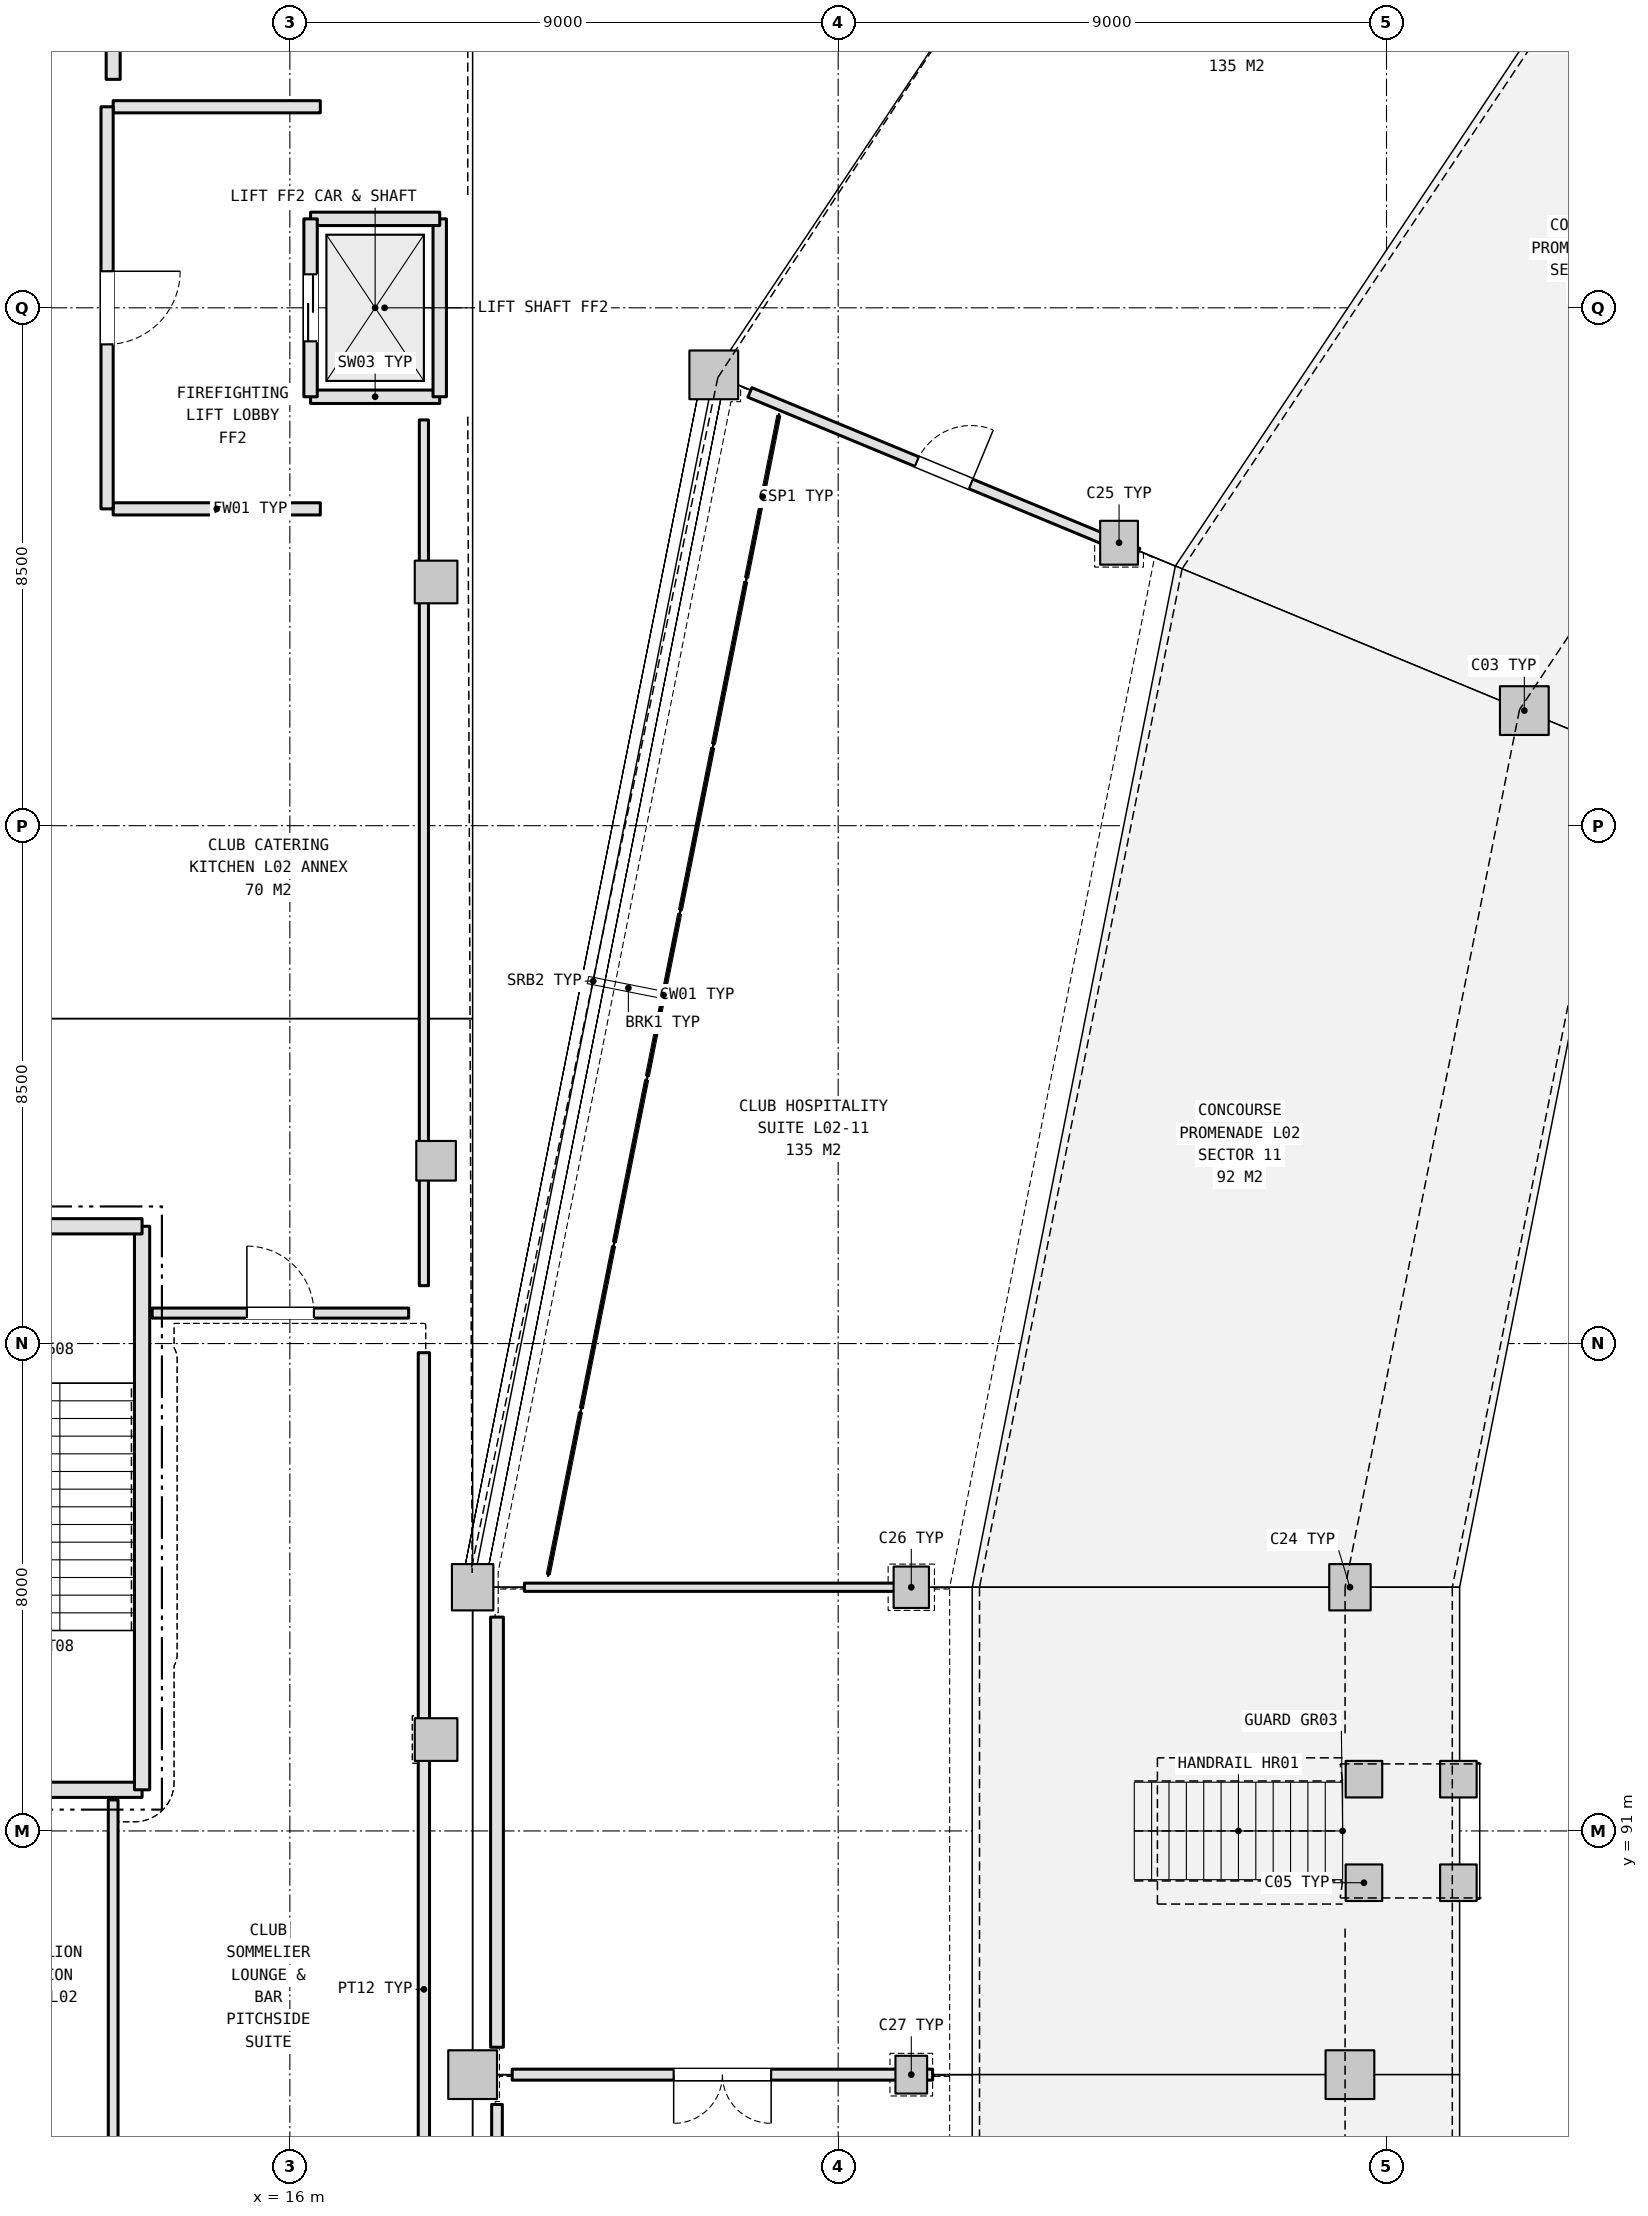
"""IFC4 building model, lengths in metres.
Left out: names, types, materials, properties, quantities, classifications, styles, units other than length and angle.
Written with IfcOpenShell. Run it as: python <this file> out.ifc"""

import sys

from ifc_helpers import new_model, si_unit, direction, frame, frame_2d, origin, origin_2d, place, context, subcontext, project, spatial, rectangle, extrude, element, fill, save


model = new_model("IFC4")
c1 = context("Model", 3, precision=1e-05, world=origin(), true_north=direction((0.0, 1.0)))
c2 = subcontext(c1, "Body", "Model", "MODEL_VIEW")
j1 = project(units=[si_unit("LENGTHUNIT", "METRE"), si_unit("PLANEANGLEUNIT", "RADIAN")], contexts=[c1])
p1 = place(None, origin())
s1 = spatial("IfcSite", under=j1, at=p1, CompositionType="ELEMENT")
p2 = place(p1, origin())
s2 = spatial("IfcBuilding", under=s1, at=p2, CompositionType="ELEMENT")
p3 = place(p2, frame((0.0, 0.0, 10.8)))
s3 = spatial("IfcBuildingStorey", under=s2, at=p3, CompositionType="ELEMENT", Elevation=10.8)
p4 = place(p3, frame((36.262, 109.389, 0.0), z_axis=(0.0, 0.0, 1.0), x_axis=(1.0, 0.0, 0.0)))
e1 = element("IfcColumn", 1, at=p4, inside=s3, PredefinedType="COLUMN", context=c2, shape_type="SweptSolid", body=[
    extrude(rectangle(XDim=0.8, YDim=0.8, at=origin_2d()), origin(), (0.0, 0.0, 1.0), 5.4),
])
p5 = place(p3, frame((29.61, 112.144, 0.0), z_axis=(0.0, 0.0, 1.0), x_axis=(1.0, 0.0, 0.0)))
e2 = element("IfcColumn", 2, at=p5, inside=s3, PredefinedType="COLUMN", context=c2, shape_type="SweptSolid", body=[
    extrude(rectangle(XDim=0.62, YDim=0.72, at=origin_2d()), origin(), (0.0, 0.0, 1.0), 5.4),
])
p6 = place(p3, frame((22.958, 114.9, 0.0), z_axis=(0.0, 0.0, 1.0), x_axis=(1.0, 0.0, 0.0)))
e3 = element("IfcColumn", 3, at=p6, inside=s3, PredefinedType="COLUMN", context=c2, shape_type="SweptSolid", body=[
    extrude(rectangle(XDim=0.8, YDim=0.8, at=origin_2d()), origin(), (0.0, 0.0, 1.0), 5.4),
])
p7 = place(p3, frame((33.4, 95.0, 0.0), z_axis=(0.0, 0.0, 1.0), x_axis=(1.0, 0.0, 0.0)))
e4 = element("IfcColumn", 4, at=p7, inside=s3, PredefinedType="COLUMN", context=c2, shape_type="SweptSolid", body=[
    extrude(rectangle(XDim=0.68, YDim=0.76, at=origin_2d()), origin(), (0.0, 0.0, 1.0), 5.4),
])
p8 = place(p3, frame((26.2, 95.0, 0.0), z_axis=(0.0, 0.0, 1.0), x_axis=(1.0, 0.0, 0.0)))
e5 = element("IfcColumn", 5, at=p8, inside=s3, PredefinedType="COLUMN", context=c2, shape_type="SweptSolid", body=[
    extrude(rectangle(XDim=0.58, YDim=0.68, at=origin_2d()), origin(), (0.0, 0.0, 1.0), 5.4),
])
p9 = place(p3, frame((19.0, 95.0, 0.0), z_axis=(0.0, 0.0, 1.0), x_axis=(1.0, 0.0, 0.0)))
e6 = element("IfcColumn", 6, at=p9, inside=s3, PredefinedType="COLUMN", context=c2, shape_type="SweptSolid", body=[
    extrude(rectangle(XDim=0.68, YDim=0.76, at=origin_2d()), origin(), (0.0, 0.0, 1.0), 5.4),
])
p10 = place(p3, frame((33.4, 87.0, 0.0), z_axis=(0.0, 0.0, 1.0), x_axis=(1.0, 0.0, 0.0)))
e7 = element("IfcColumn", 7, at=p10, inside=s3, PredefinedType="COLUMN", context=c2, shape_type="SweptSolid", body=[
    extrude(rectangle(XDim=0.8, YDim=0.8, at=origin_2d()), origin(), (0.0, 0.0, 1.0), 5.4),
])
p11 = place(p3, frame((26.2, 87.0, 0.0), z_axis=(0.0, 0.0, 1.0), x_axis=(1.0, 0.0, 0.0)))
e8 = element("IfcColumn", 8, at=p11, inside=s3, PredefinedType="COLUMN", context=c2, shape_type="SweptSolid", body=[
    extrude(rectangle(XDim=0.52, YDim=0.62, at=origin_2d()), origin(), (0.0, 0.0, 1.0), 5.4),
])
p12 = place(p3, frame((19.0, 87.0, 0.0), z_axis=(0.0, 0.0, 1.0), x_axis=(1.0, 0.0, 0.0)))
e9 = element("IfcColumn", 9, at=p12, inside=s3, PredefinedType="COLUMN", context=c2, shape_type="SweptSolid", body=[
    extrude(rectangle(XDim=0.8, YDim=0.8, at=origin_2d()), origin(), (0.0, 0.0, 1.0), 5.4),
])
p13 = place(p3, frame((18.4, 92.5, 0.0), z_axis=(0.0, 0.0, 1.0), x_axis=(1.0, 0.0, 0.0)))
e10 = element("IfcColumn", 10, at=p13, inside=s3, PredefinedType="COLUMN", context=c2, shape_type="SweptSolid", body=[
    extrude(rectangle(XDim=0.7, YDim=0.7, at=origin_2d()), origin(), (0.0, 0.0, 1.0), 5.4),
])
p14 = place(p3, frame((18.4, 102.0, 0.0), z_axis=(0.0, 0.0, 1.0), x_axis=(1.0, 0.0, 0.0)))
e11 = element("IfcColumn", 11, at=p14, inside=s3, PredefinedType="COLUMN", context=c2, shape_type="SweptSolid", body=[
    extrude(rectangle(XDim=0.65, YDim=0.65, at=origin_2d()), origin(), (0.0, 0.0, 1.0), 5.4),
])
p15 = place(p3, frame((18.4, 111.5, 0.0), z_axis=(0.0, 0.0, 1.0), x_axis=(1.0, 0.0, 0.0)))
e12 = element("IfcColumn", 12, at=p15, inside=s3, PredefinedType="COLUMN", context=c2, shape_type="SweptSolid", body=[
    extrude(rectangle(XDim=0.7, YDim=0.7, at=origin_2d()), origin(), (0.0, 0.0, 1.0), 5.4),
])
p16 = place(p3, frame((8.275, 91.675, 0.0), z_axis=(0.0, 0.0, 1.0), x_axis=(1.0, 0.0, 0.0)))
e13 = element("IfcWall", 13, at=p16, inside=s3, PredefinedType="SHEAR", context=c2, shape_type="SweptSolid", body=[
    extrude(rectangle(XDim=5.299, YDim=0.25, at=frame_2d((2.65, 0.0))), origin(), (0.0, 0.0, 1.0), 5.15),
])
p17 = place(p3, frame((13.575, 91.675, 0.0), z_axis=(0.0, 0.0, 1.0), x_axis=(0.0, 1.0, 0.0)))
e14 = element("IfcWall", 14, at=p17, inside=s3, PredefinedType="SHEAR", context=c2, shape_type="SweptSolid", body=[
    extrude(rectangle(XDim=9.249, YDim=0.25, at=frame_2d((4.625, 0.0))), origin(), (0.0, 0.0, 1.0), 5.15),
])
p18 = place(p3, frame((13.575, 100.925, 0.0), z_axis=(0.0, 0.0, 1.0), x_axis=(-1.0, 0.0, 0.0)))
e15 = element("IfcWall", 15, at=p18, inside=s3, PredefinedType="SHEAR", context=c2, shape_type="SweptSolid", body=[
    extrude(rectangle(XDim=5.299, YDim=0.25, at=frame_2d((2.65, 0.0))), origin(), (0.0, 0.0, 1.0), 5.15),
])
p19 = place(p18, frame((1.9, 0.0, 0.0)))
e16 = element("IfcOpeningElement", 16, at=p19, cuts=e15, PredefinedType="OPENING", context=c2, shape_type="SweptSolid", body=[
    extrude(rectangle(XDim=1.5, YDim=2.2, at=frame_2d((0.75, 1.1))), frame((0.0, 0.135, 0.0), z_axis=(0.0, -1.0, 0.0), x_axis=(1.0, 0.0, 0.0)), (0.0, 0.0, 1.0), 0.27),
])
for number, where, z_axis, x_axis in (
    (17, (33.63, 90.15, 0.0), (0.0, 0.0, 1.0), (1.0, 0.0, 0.0)),
    (18, (35.18, 90.15, 0.0), (0.0, 0.0, 1.0), (1.0, 0.0, 0.0)),
    (19, (35.18, 91.85, 0.0), (0.0, 0.0, 1.0), (1.0, 0.0, 0.0)),
    (20, (33.63, 91.85, 0.0), (0.0, 0.0, 1.0), (1.0, 0.0, 0.0)),
):
    element("IfcColumn", number, at=place(p3, frame(where, z_axis=z_axis, x_axis=x_axis)), inside=s3, PredefinedType="COLUMN", context=c2, shape_type="SweptSolid", body=[
        extrude(rectangle(XDim=0.6, YDim=0.6, at=origin_2d()), origin(), (0.0, 0.0, 1.0), 2.04),
    ])
p20 = place(p3, frame((16.34, 114.54, 0.0), z_axis=(0.0, 0.0, 1.0), x_axis=(1.0, 0.0, 0.0)))
e21 = element("IfcWall", 21, at=p20, inside=s3, PredefinedType="SHEAR", context=c2, shape_type="SweptSolid", body=[
    extrude(rectangle(XDim=2.12, YDim=0.22, at=frame_2d((1.06, 0.0))), origin(), (0.0, 0.0, 1.0), 5.15),
])
p21 = place(p3, frame((18.46, 114.54, 0.0), z_axis=(0.0, 0.0, 1.0), x_axis=(0.0, 1.0, 0.0)))
e22 = element("IfcWall", 22, at=p21, inside=s3, PredefinedType="SHEAR", context=c2, shape_type="SweptSolid", body=[
    extrude(rectangle(XDim=2.92, YDim=0.22, at=frame_2d((1.46, 0.0))), origin(), (0.0, 0.0, 1.0), 5.15),
])
p22 = place(p3, frame((18.46, 117.46, 0.0), z_axis=(0.0, 0.0, 1.0), x_axis=(-1.0, 0.0, 0.0)))
e23 = element("IfcWall", 23, at=p22, inside=s3, PredefinedType="SHEAR", context=c2, shape_type="SweptSolid", body=[
    extrude(rectangle(XDim=2.12, YDim=0.22, at=frame_2d((1.06, 0.0))), origin(), (0.0, 0.0, 1.0), 5.15),
])
p23 = place(p3, frame((16.34, 117.46, 0.0), z_axis=(0.0, 0.0, 1.0), x_axis=(0.0, -1.0, 0.0)))
e24 = element("IfcWall", 24, at=p23, inside=s3, PredefinedType="SHEAR", context=c2, shape_type="SweptSolid", body=[
    extrude(rectangle(XDim=2.92, YDim=0.22, at=frame_2d((1.46, 0.0))), origin(), (0.0, 0.0, 1.0), 5.15),
])
p24 = place(p23, frame((0.91, 0.0, 0.0)))
e25 = element("IfcOpeningElement", 25, at=p24, cuts=e24, PredefinedType="OPENING", context=c2, shape_type="SweptSolid", body=[
    extrude(rectangle(XDim=1.1, YDim=2.2, at=frame_2d((0.55, 1.1))), frame((0.0, 0.12, 0.0), z_axis=(0.0, -1.0, 0.0), x_axis=(1.0, 0.0, 0.0)), (0.0, 0.0, 1.0), 0.24),
])
for number, where, z_axis, x_axis in (
    (26, (13.1, 112.7, 0.0), (0.0, 0.0, 1.0), (1.0, 0.0, 0.0)),
    (27, (16.5, 119.3, 0.0), (0.0, 0.0, 1.0), (-1.0, 0.0, 0.0)),
):
    element("IfcWall", number, at=place(p3, frame(where, z_axis=z_axis, x_axis=x_axis)), inside=s3, PredefinedType="SOLIDWALL", context=c2, shape_type="SweptSolid", body=[
        extrude(rectangle(XDim=3.4, YDim=0.2, at=frame_2d((1.7, 0.0))), origin(), (0.0, 0.0, 1.0), 5.12),
    ])
p25 = place(p3, frame((13.0, 119.3, 0.0), z_axis=(0.0, 0.0, 1.0), x_axis=(0.0, -1.0, 0.0)))
e28 = element("IfcWall", 28, at=p25, inside=s3, PredefinedType="SOLIDWALL", context=c2, shape_type="SweptSolid", body=[
    extrude(rectangle(XDim=6.6, YDim=0.2, at=frame_2d((3.3, 0.0))), origin(), (0.0, 0.0, 1.0), 5.12),
])
p26 = place(p25, frame((2.7, 0.0, 0.0)))
e29 = element("IfcOpeningElement", 29, at=p26, cuts=e28, PredefinedType="OPENING", context=c2, shape_type="SweptSolid", body=[
    extrude(rectangle(XDim=1.2, YDim=2.2, at=frame_2d((0.6, 1.1))), frame((0.0, 0.11, 0.0), z_axis=(0.0, -1.0, 0.0), x_axis=(1.0, 0.0, 0.0)), (0.0, 0.0, 1.0), 0.22),
])
p27 = place(p3, frame((13.1, 77.75, 0.0), z_axis=(0.0, 0.0, 1.0), x_axis=(0.0, 1.0, 0.0)))
e30 = element("IfcWall", 30, at=p27, inside=s3, PredefinedType="PARTITIONING", context=c2, shape_type="SweptSolid", body=[
    extrude(rectangle(XDim=13.76, YDim=0.16, at=frame_2d((6.88, 0.0))), origin(), (0.0, 0.0, 1.0), 4.678),
])
p28 = place(p27, frame((6.305, 0.0, 0.0)))
e31 = element("IfcOpeningElement", 31, at=p28, cuts=e30, PredefinedType="OPENING", context=c2, shape_type="SweptSolid", body=[
    extrude(rectangle(XDim=1.15, YDim=2.2, at=frame_2d((0.575, 1.1))), frame((0.0, 0.09, 0.0), z_axis=(0.0, -1.0, 0.0), x_axis=(1.0, 0.0, 0.0)), (0.0, 0.0, 1.0), 0.18),
])
p29 = place(p3, frame((18.2, 98.85, 0.0), z_axis=(0.0, 0.0, 1.0), x_axis=(0.0, -1.0, 0.0)))
e32 = element("IfcWall", 32, at=p29, inside=s3, PredefinedType="PARTITIONING", context=c2, shape_type="SweptSolid", body=[
    extrude(rectangle(XDim=20.9, YDim=0.185, at=frame_2d((10.45, 0.0))), origin(), (0.0, 0.0, 1.0), 4.485),
])
p30 = place(p3, frame((17.95, 99.5, 0.0), z_axis=(0.0, 0.0, 1.0), x_axis=(-1.0, 0.0, 0.0)))
e33 = element("IfcWall", 33, at=p30, inside=s3, PredefinedType="PARTITIONING", context=c2, shape_type="SweptSolid", body=[
    extrude(rectangle(XDim=4.21, YDim=0.165, at=frame_2d((2.105, 0.0))), origin(), (0.0, 0.0, 1.0), 5.12),
])
p31 = place(p30, frame((1.555, 0.0, 0.0)))
e34 = element("IfcOpeningElement", 34, at=p31, cuts=e33, PredefinedType="OPENING", context=c2, shape_type="SweptSolid", body=[
    extrude(rectangle(XDim=1.1, YDim=2.15, at=frame_2d((0.55, 1.075))), frame((0.0, 0.093, 0.0), z_axis=(0.0, -1.0, 0.0), x_axis=(1.0, 0.0, 0.0)), (0.0, 0.0, 1.0), 0.185),
])
p32 = place(p3, frame((18.2, 114.16, 0.0), z_axis=(0.0, 0.0, 1.0), x_axis=(0.0, -1.0, 0.0)))
e35 = element("IfcWall", 35, at=p32, inside=s3, PredefinedType="PARTITIONING", context=c2, shape_type="SweptSolid", body=[
    extrude(rectangle(XDim=14.21, YDim=0.15, at=frame_2d((7.105, 0.0))), origin(), (0.0, 0.0, 1.0), 4.485),
])
p33 = place(p3, frame((13.1, 119.75, 0.0), z_axis=(0.0, 0.0, 1.0), x_axis=(0.0, 1.0, 0.0)))
e36 = element("IfcWall", 36, at=p33, inside=s3, PredefinedType="PLUMBINGWALL", context=c2, shape_type="SweptSolid", body=[
    extrude(rectangle(XDim=9.3, YDim=0.23, at=frame_2d((4.65, 0.0))), origin(), (0.0, 0.0, 1.0), 4.678),
])
p34 = place(p33, frame((4.16, 0.0, 0.0)))
e37 = element("IfcOpeningElement", 37, at=p34, cuts=e36, PredefinedType="OPENING", context=c2, shape_type="SweptSolid", body=[
    extrude(rectangle(XDim=0.98, YDim=2.15, at=frame_2d((0.49, 1.075))), frame((0.0, 0.125, 0.0), z_axis=(0.0, -1.0, 0.0), x_axis=(1.0, 0.0, 0.0)), (0.0, 0.0, 1.0), 0.25),
])
p35 = place(p3, frame((23.551, 114.611, 0.0), z_axis=(0.0, 0.0, 1.0), x_axis=(0.923880834014, -0.382680290244, 0.0)))
e38 = element("IfcWall", 38, at=p35, inside=s3, PredefinedType="PARTITIONING", context=c2, shape_type="SweptSolid", body=[
    extrude(rectangle(XDim=6.892, YDim=0.17, at=frame_2d((3.446, 0.0))), origin(), (0.0, 0.0, 1.0), 4.255),
])
p36 = place(p35, frame((2.966, 0.0, 0.0)))
e39 = element("IfcOpeningElement", 39, at=p36, cuts=e38, PredefinedType="OPENING", context=c2, shape_type="SweptSolid", body=[
    extrude(rectangle(XDim=0.96, YDim=2.15, at=frame_2d((0.48, 1.075))), frame((0.0, 0.095, 0.0), z_axis=(0.0, -1.0, 0.0), x_axis=(1.0, 0.0, 0.0)), (0.0, 0.0, 1.0), 0.19),
])
p37 = place(p3, frame((26.35, 95.0, 0.0), z_axis=(0.0, 0.0, 1.0), x_axis=(-1.0, 0.0, 0.0)))
e40 = element("IfcWall", 40, at=p37, inside=s3, PredefinedType="PARTITIONING", context=c2, shape_type="SweptSolid", body=[
    extrude(rectangle(XDim=6.5, YDim=0.135, at=frame_2d((3.25, 0.0))), origin(), (0.0, 0.0, 1.0), 4.285),
])
p38 = place(p3, frame((26.55, 87.0, 0.0), z_axis=(0.0, 0.0, 1.0), x_axis=(-1.0, 0.0, 0.0)))
e41 = element("IfcWall", 41, at=p38, inside=s3, PredefinedType="PARTITIONING", context=c2, shape_type="SweptSolid", body=[
    extrude(rectangle(XDim=6.9, YDim=0.18, at=frame_2d((3.45, 0.0))), origin(), (0.0, 0.0, 1.0), 4.215),
])
p39 = place(p38, frame((2.65, 0.0, 0.0)))
e42 = element("IfcOpeningElement", 42, at=p39, cuts=e41, PredefinedType="OPENING", context=c2, shape_type="SweptSolid", body=[
    extrude(rectangle(XDim=1.6, YDim=2.2, at=frame_2d((0.8, 1.1))), frame((0.0, 0.1, 0.0), z_axis=(0.0, -1.0, 0.0), x_axis=(1.0, 0.0, 0.0)), (0.0, 0.0, 1.0), 0.2),
])
p40 = place(p3, frame((19.4, 87.45, 0.0), z_axis=(0.0, 0.0, 1.0), x_axis=(0.0, 1.0, 0.0)))
e43 = element("IfcWall", 43, at=p40, inside=s3, PredefinedType="PLUMBINGWALL", context=c2, shape_type="SweptSolid", body=[
    extrude(rectangle(XDim=7.06, YDim=0.21, at=frame_2d((3.53, 0.0))), origin(), (0.0, 0.0, 1.0), 4.215),
])
p41 = place(p3, frame((19.4, 79.45, 0.0), z_axis=(0.0, 0.0, 1.0), x_axis=(0.0, 1.0, 0.0)))
e44 = element("IfcWall", 44, at=p41, inside=s3, PredefinedType="PARTITIONING", context=c2, shape_type="SweptSolid", body=[
    extrude(rectangle(XDim=7.06, YDim=0.175, at=frame_2d((3.53, 0.0))), origin(), (0.0, 0.0, 1.0), 5.12),
])
p42 = place(p24, origin())
e45 = element("IfcDoor", 45, at=p42, inside=s3, OperationType="DOUBLE_DOOR_SLIDING", PredefinedType="DOOR", context=c2, shape_type="SweptSolid", body=[
    extrude(rectangle(XDim=1.1, YDim=2.2, at=frame_2d((0.55, 1.1))), frame((0.0, 0.025, 0.0), z_axis=(0.0, -1.0, 0.0), x_axis=(1.0, 0.0, 0.0)), (0.0, 0.0, 1.0), 0.05),
])
fill(e25, e45)
p43 = place(p26, origin())
e46 = element("IfcDoor", 46, at=p43, inside=s3, OperationType="SINGLE_SWING_LEFT", PredefinedType="DOOR", context=c2, shape_type="SweptSolid", body=[
    extrude(rectangle(XDim=1.2, YDim=2.2, at=frame_2d((0.6, 1.1))), frame((0.0, 0.025, 0.0), z_axis=(0.0, -1.0, 0.0), x_axis=(1.0, 0.0, 0.0)), (0.0, 0.0, 1.0), 0.05),
])
fill(e29, e46)
p44 = place(p31, frame((1.1, 0.0, 0.0), z_axis=(0.0, 0.0, 1.0), x_axis=(-1.0, 0.0, 0.0)))
e47 = element("IfcDoor", 47, at=p44, inside=s3, OperationType="SINGLE_SWING_RIGHT", PredefinedType="DOOR", context=c2, shape_type="SweptSolid", body=[
    extrude(rectangle(XDim=1.1, YDim=2.15, at=frame_2d((0.55, 1.075))), frame((0.0, 0.025, 0.0), z_axis=(0.0, -1.0, 0.0), x_axis=(1.0, 0.0, 0.0)), (0.0, 0.0, 1.0), 0.05),
])
fill(e34, e47)
p45 = place(p36, origin())
e48 = element("IfcDoor", 48, at=p45, inside=s3, OperationType="SINGLE_SWING_RIGHT", PredefinedType="DOOR", context=c2, shape_type="SweptSolid", body=[
    extrude(rectangle(XDim=0.96, YDim=2.15, at=frame_2d((0.48, 1.075))), frame((0.0, 0.025, 0.0), z_axis=(0.0, -1.0, 0.0), x_axis=(1.0, 0.0, 0.0)), (0.0, 0.0, 1.0), 0.05),
])
fill(e39, e48)
p46 = place(p39, origin())
e49 = element("IfcDoor", 49, at=p46, inside=s3, OperationType="DOUBLE_DOOR_SINGLE_SWING", PredefinedType="DOOR", context=c2, shape_type="SweptSolid", body=[
    extrude(rectangle(XDim=1.6, YDim=2.2, at=frame_2d((0.8, 1.1))), frame((0.0, 0.025, 0.0), z_axis=(0.0, -1.0, 0.0), x_axis=(1.0, 0.0, 0.0)), (0.0, 0.0, 1.0), 0.05),
])
fill(e42, e49)
save(model, sys.argv[1])
